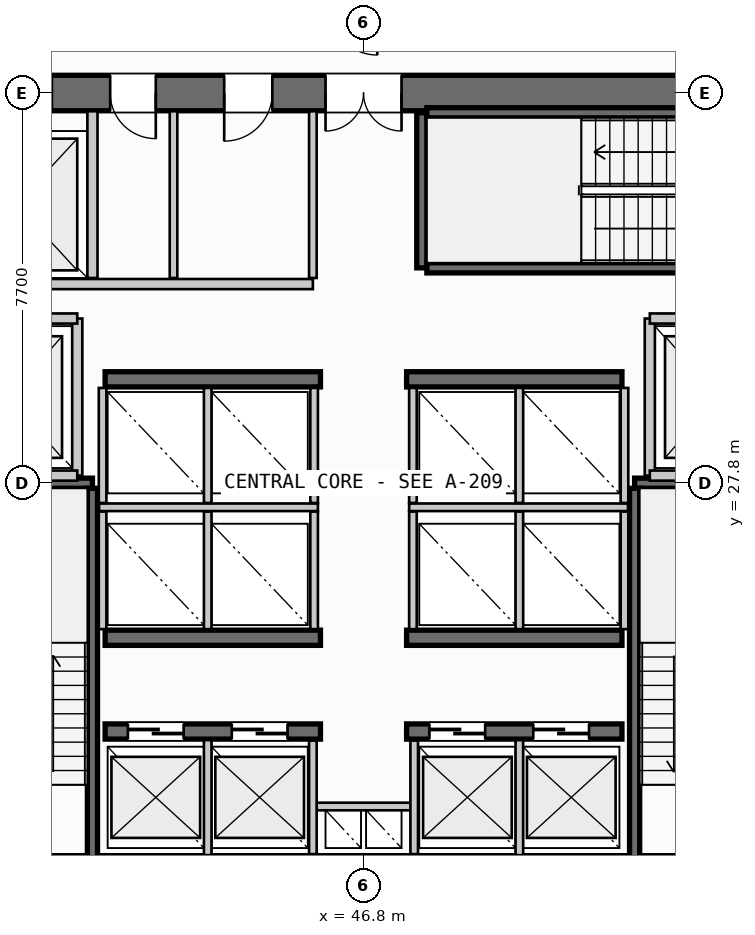
"""IFC4 building model, lengths in metres.
Left out: names, types, materials, properties, quantities, classifications, styles, units other than length and angle.
Written with IfcOpenShell. Run it as: python <this file> out.ifc"""

import sys

from ifc_helpers import new_model, si_unit, direction, frame, frame_2d, origin, place, context, subcontext, project, spatial, rectangle, extrude, source, transform, mapped, element, fill, save


model = new_model("IFC4")
c1 = context("Model", 3, precision=1e-05, world=origin(), true_north=direction((0.0, 1.0)))
c2 = subcontext(c1, "Body", "Model", "MODEL_VIEW")
j1 = project(units=[si_unit("LENGTHUNIT", "METRE"), si_unit("PLANEANGLEUNIT", "RADIAN")], contexts=[c1])
p1 = place(None, origin())
s1 = spatial("IfcSite", under=j1, at=p1, CompositionType="ELEMENT")
p2 = place(p1, origin())
s2 = spatial("IfcBuilding", under=s1, at=p2, CompositionType="ELEMENT")
p3 = place(p2, frame((0.0, 0.0, 60.0)))
s3 = spatial("IfcBuildingStorey", under=s2, at=p3, CompositionType="ELEMENT", Elevation=60.0)
p4 = place(p3, frame((38.0, 20.1, 0.0), z_axis=(0.0, 0.0, 1.0), x_axis=(1.0, 0.0, 0.0)))
e1 = element("IfcWall", 1, at=p4, inside=s3, PredefinedType="SHEAR", context=c2, shape_type="SweptSolid", body=[
    extrude(rectangle(XDim=17.6, YDim=0.7, at=frame_2d((8.8, 0.0))), origin(), (0.0, 0.0, 1.0), 3.55),
])
p5 = place(p4, frame((1.4, 0.0, 0.0)))
e2 = element("IfcOpeningElement", 2, at=p5, cuts=e1, PredefinedType="OPENING", context=c2, shape_type="SweptSolid", body=[
    extrude(rectangle(XDim=1.05, YDim=2.15, at=frame_2d((0.525, 1.075))), frame((0.0, 0.36, 0.0), z_axis=(0.0, -1.0, 0.0), x_axis=(1.0, 0.0, 0.0)), (0.0, 0.0, 1.0), 0.72),
])
p6 = place(p4, frame((15.15, 0.0, 0.0)))
e3 = element("IfcOpeningElement", 3, at=p6, cuts=e1, PredefinedType="OPENING", context=c2, shape_type="SweptSolid", body=[
    extrude(rectangle(XDim=1.05, YDim=2.15, at=frame_2d((0.525, 1.075))), frame((0.0, 0.36, 0.0), z_axis=(0.0, -1.0, 0.0), x_axis=(1.0, 0.0, 0.0)), (0.0, 0.0, 1.0), 0.72),
])
p7 = place(p3, frame((55.6, 35.5, 0.0), z_axis=(0.0, 0.0, 1.0), x_axis=(-1.0, 0.0, 0.0)))
e4 = element("IfcWall", 4, at=p7, inside=s3, PredefinedType="SHEAR", context=c2, shape_type="SweptSolid", body=[
    extrude(rectangle(XDim=17.6, YDim=0.7, at=frame_2d((8.8, 0.0))), origin(), (0.0, 0.0, 1.0), 3.55),
])
p8 = place(p7, frame((8.05, 0.0, 0.0)))
e5 = element("IfcOpeningElement", 5, at=p8, cuts=e4, PredefinedType="OPENING", context=c2, shape_type="SweptSolid", body=[
    extrude(rectangle(XDim=1.5, YDim=2.2, at=frame_2d((0.75, 1.1))), frame((0.0, 0.36, 0.0), z_axis=(0.0, -1.0, 0.0), x_axis=(1.0, 0.0, 0.0)), (0.0, 0.0, 1.0), 0.72),
])
p9 = place(p7, frame((14.95, 0.0, 0.0)))
e6 = element("IfcOpeningElement", 6, at=p9, cuts=e4, PredefinedType="OPENING", context=c2, shape_type="SweptSolid", body=[
    extrude(rectangle(XDim=1.4, YDim=2.3, at=frame_2d((0.7, 1.15))), frame((0.0, 0.36, 0.0), z_axis=(0.0, -1.0, 0.0), x_axis=(1.0, 0.0, 0.0)), (0.0, 0.0, 1.0), 0.72),
])
p10 = place(p7, frame((12.9, 0.0, 0.0)))
e7 = element("IfcOpeningElement", 7, at=p10, cuts=e4, PredefinedType="OPENING", context=c2, shape_type="SweptSolid", body=[
    extrude(rectangle(XDim=0.9, YDim=2.15, at=frame_2d((0.45, 1.075))), frame((0.0, 0.36, 0.0), z_axis=(0.0, -1.0, 0.0), x_axis=(1.0, 0.0, 0.0)), (0.0, 0.0, 1.0), 0.72),
])
p11 = place(p7, frame((10.6, 0.0, 0.0)))
e8 = element("IfcOpeningElement", 8, at=p11, cuts=e4, PredefinedType="OPENING", context=c2, shape_type="SweptSolid", body=[
    extrude(rectangle(XDim=0.95, YDim=2.15, at=frame_2d((0.475, 1.075))), frame((0.0, 0.36, 0.0), z_axis=(0.0, -1.0, 0.0), x_axis=(1.0, 0.0, 0.0)), (0.0, 0.0, 1.0), 0.72),
])
p12 = place(p3, frame((41.7, 22.9, 0.0), z_axis=(0.0, 0.0, 1.0), x_axis=(1.0, 0.0, 0.0)))
e9 = element("IfcWall", 9, at=p12, inside=s3, PredefinedType="SHEAR", context=c2, shape_type="SweptSolid", body=[
    extrude(rectangle(XDim=4.25, YDim=0.3, at=frame_2d((2.125, 0.0))), origin(), (0.0, 0.0, 1.0), 3.55),
])
p13 = place(p12, frame((0.45, 0.0, 0.0)))
e10 = element("IfcOpeningElement", 10, at=p13, cuts=e9, PredefinedType="OPENING", context=c2, shape_type="SweptSolid", body=[
    extrude(rectangle(XDim=1.1, YDim=2.2, at=frame_2d((0.55, 1.1))), frame((0.0, 0.16, 0.0), z_axis=(0.0, -1.0, 0.0), x_axis=(1.0, 0.0, 0.0)), (0.0, 0.0, 1.0), 0.32),
])
p14 = place(p12, frame((2.5, 0.0, 0.0)))
e11 = element("IfcOpeningElement", 11, at=p14, cuts=e9, PredefinedType="OPENING", context=c2, shape_type="SweptSolid", body=[
    extrude(rectangle(XDim=1.1, YDim=2.2, at=frame_2d((0.55, 1.1))), frame((0.0, 0.16, 0.0), z_axis=(0.0, -1.0, 0.0), x_axis=(1.0, 0.0, 0.0)), (0.0, 0.0, 1.0), 0.32),
])
p15 = place(p3, frame((47.65, 22.9, 0.0), z_axis=(0.0, 0.0, 1.0), x_axis=(1.0, 0.0, 0.0)))
e12 = element("IfcWall", 12, at=p15, inside=s3, PredefinedType="SHEAR", context=c2, shape_type="SweptSolid", body=[
    extrude(rectangle(XDim=4.25, YDim=0.3, at=frame_2d((2.125, 0.0))), origin(), (0.0, 0.0, 1.0), 3.55),
])
p16 = place(p15, frame((0.45, 0.0, 0.0)))
e13 = element("IfcOpeningElement", 13, at=p16, cuts=e12, PredefinedType="OPENING", context=c2, shape_type="SweptSolid", body=[
    extrude(rectangle(XDim=1.1, YDim=2.2, at=frame_2d((0.55, 1.1))), frame((0.0, 0.16, 0.0), z_axis=(0.0, -1.0, 0.0), x_axis=(1.0, 0.0, 0.0)), (0.0, 0.0, 1.0), 0.32),
])
p17 = place(p15, frame((2.5, 0.0, 0.0)))
e14 = element("IfcOpeningElement", 14, at=p17, cuts=e12, PredefinedType="OPENING", context=c2, shape_type="SweptSolid", body=[
    extrude(rectangle(XDim=1.1, YDim=2.2, at=frame_2d((0.55, 1.1))), frame((0.0, 0.16, 0.0), z_axis=(0.0, -1.0, 0.0), x_axis=(1.0, 0.0, 0.0)), (0.0, 0.0, 1.0), 0.32),
])
for number, where, z_axis, x_axis in (
    (15, (41.7, 24.75, 0.0), (0.0, 0.0, 1.0), (1.0, 0.0, 0.0)),
    (16, (47.65, 24.75, 0.0), (0.0, 0.0, 1.0), (1.0, 0.0, 0.0)),
    (17, (41.7, 29.85, 0.0), (0.0, 0.0, 1.0), (1.0, 0.0, 0.0)),
    (18, (47.65, 29.85, 0.0), (0.0, 0.0, 1.0), (1.0, 0.0, 0.0)),
):
    element("IfcWall", number, at=place(p3, frame(where, z_axis=z_axis, x_axis=x_axis)), inside=s3, PredefinedType="SHEAR", context=c2, shape_type="SweptSolid", body=[
        extrude(rectangle(XDim=4.25, YDim=0.3, at=frame_2d((2.125, 0.0))), origin(), (0.0, 0.0, 1.0), 3.55),
    ])
p18 = place(p3, frame((38.39, 27.8, 0.0), z_axis=(0.0, 0.0, 1.0), x_axis=(1.0, 0.0, 0.0)))
e19 = element("IfcWall", 19, at=p18, inside=s3, PredefinedType="SHEAR", context=c2, shape_type="SweptSolid", body=[
    extrude(rectangle(XDim=3.06, YDim=0.2, at=frame_2d((1.53, 0.0))), origin(), (0.0, 0.0, 1.0), 3.55),
])
p19 = place(p3, frame((41.45, 27.7, 0.0), z_axis=(0.0, 0.0, 1.0), x_axis=(0.0, -1.0, 0.0)))
e20 = element("IfcWall", 20, at=p19, inside=s3, PredefinedType="SHEAR", context=c2, shape_type="SweptSolid", body=[
    extrude(rectangle(XDim=7.35, YDim=0.2, at=frame_2d((3.675, 0.0))), origin(), (0.0, 0.0, 1.0), 3.55),
])
p20 = place(p3, frame((52.15, 27.8, 0.0), z_axis=(0.0, 0.0, 1.0), x_axis=(1.0, 0.0, 0.0)))
e21 = element("IfcWall", 21, at=p20, inside=s3, PredefinedType="SHEAR", context=c2, shape_type="SweptSolid", body=[
    extrude(rectangle(XDim=3.06, YDim=0.2, at=frame_2d((1.53, 0.0))), origin(), (0.0, 0.0, 1.0), 3.55),
])
p21 = place(p3, frame((52.15, 20.35, 0.0), z_axis=(0.0, 0.0, 1.0), x_axis=(0.0, 1.0, 0.0)))
e22 = element("IfcWall", 22, at=p21, inside=s3, PredefinedType="SHEAR", context=c2, shape_type="SweptSolid", body=[
    extrude(rectangle(XDim=7.35, YDim=0.2, at=frame_2d((3.675, 0.0))), origin(), (0.0, 0.0, 1.0), 3.55),
])
p22 = place(p3, frame((47.95, 32.05, 0.0), z_axis=(0.0, 0.0, 1.0), x_axis=(0.0, 1.0, 0.0)))
e23 = element("IfcWall", 23, at=p22, inside=s3, PredefinedType="SHEAR", context=c2, shape_type="SweptSolid", body=[
    extrude(rectangle(XDim=3.06, YDim=0.2, at=frame_2d((1.53, 0.0))), origin(), (0.0, 0.0, 1.0), 3.55),
])
for number, where, z_axis, x_axis in (
    (24, (48.05, 35.11, 0.0), (0.0, 0.0, 1.0), (1.0, 0.0, 0.0)),
    (25, (55.4, 32.05, 0.0), (0.0, 0.0, 1.0), (-1.0, 0.0, 0.0)),
):
    element("IfcWall", number, at=place(p3, frame(where, z_axis=z_axis, x_axis=x_axis)), inside=s3, PredefinedType="SHEAR", context=c2, shape_type="SweptSolid", body=[
        extrude(rectangle(XDim=7.35, YDim=0.2, at=frame_2d((3.675, 0.0))), origin(), (0.0, 0.0, 1.0), 3.55),
    ])
p23 = place(p3, frame((45.8, 21.42, 0.0), z_axis=(0.0, 0.0, 1.0), x_axis=(1.0, 0.0, 0.0)))
e26 = element("IfcWall", 26, at=p23, inside=s3, PredefinedType="PARTITIONING", context=c2, shape_type="SweptSolid", body=[
    extrude(rectangle(XDim=2.0, YDim=0.15, at=frame_2d((1.0, 0.0))), origin(), (0.0, 0.0, 1.0), 2.645),
])
for number, where, z_axis, x_axis in (
    (27, (45.8, 20.48, 0.0), (0.0, 0.0, 1.0), (0.0, 1.0, 0.0)),
    (28, (47.8, 20.48, 0.0), (0.0, 0.0, 1.0), (0.0, 1.0, 0.0)),
):
    element("IfcWall", number, at=place(p3, frame(where, z_axis=z_axis, x_axis=x_axis)), inside=s3, PredefinedType="PARTITIONING", context=c2, shape_type="SweptSolid", body=[
        extrude(rectangle(XDim=2.24, YDim=0.15, at=frame_2d((1.12, 0.0))), origin(), (0.0, 0.0, 1.0), 2.645),
    ])
p24 = place(p3, frame((41.15, 27.95, 0.0), z_axis=(0.0, 0.0, 1.0), x_axis=(0.0, 1.0, 0.0)))
e29 = element("IfcWall", 29, at=p24, inside=s3, PredefinedType="PARTITIONING", context=c2, shape_type="SweptSolid", body=[
    extrude(rectangle(XDim=3.1, YDim=0.2, at=frame_2d((1.55, 0.0))), origin(), (0.0, 0.0, 1.0), 2.645),
])
for number, where, z_axis, x_axis in (
    (30, (38.36, 27.95, 0.0), (0.0, 0.0, 1.0), (1.0, 0.0, 0.0)),
    (31, (38.36, 31.05, 0.0), (0.0, 0.0, 1.0), (1.0, 0.0, 0.0)),
):
    element("IfcWall", number, at=place(p3, frame(where, z_axis=z_axis, x_axis=x_axis)), inside=s3, PredefinedType="PARTITIONING", context=c2, shape_type="SweptSolid", body=[
        extrude(rectangle(XDim=2.79, YDim=0.2, at=frame_2d((1.395, 0.0))), origin(), (0.0, 0.0, 1.0), 2.645),
    ])
p25 = place(p3, frame((52.45, 27.95, 0.0), z_axis=(0.0, 0.0, 1.0), x_axis=(0.0, 1.0, 0.0)))
e32 = element("IfcWall", 32, at=p25, inside=s3, PredefinedType="PARTITIONING", context=c2, shape_type="SweptSolid", body=[
    extrude(rectangle(XDim=3.1, YDim=0.2, at=frame_2d((1.55, 0.0))), origin(), (0.0, 0.0, 1.0), 2.645),
])
for number, where, z_axis, x_axis in (
    (33, (52.45, 27.95, 0.0), (0.0, 0.0, 1.0), (1.0, 0.0, 0.0)),
    (34, (52.45, 31.05, 0.0), (0.0, 0.0, 1.0), (1.0, 0.0, 0.0)),
):
    element("IfcWall", number, at=place(p3, frame(where, z_axis=z_axis, x_axis=x_axis)), inside=s3, PredefinedType="PARTITIONING", context=c2, shape_type="SweptSolid", body=[
        extrude(rectangle(XDim=2.79, YDim=0.2, at=frame_2d((1.395, 0.0))), origin(), (0.0, 0.0, 1.0), 2.645),
    ])
for number, where, z_axis, x_axis in (
    (35, (43.725, 20.46, 0.0), (0.0, 0.0, 1.0), (0.0, 1.0, 0.0)),
    (36, (49.875, 20.46, 0.0), (0.0, 0.0, 1.0), (0.0, 1.0, 0.0)),
):
    element("IfcWall", number, at=place(p3, frame(where, z_axis=z_axis, x_axis=x_axis)), inside=s3, PredefinedType="PARTITIONING", context=c2, shape_type="SweptSolid", body=[
        extrude(rectangle(XDim=2.27, YDim=0.15, at=frame_2d((1.135, 0.0))), origin(), (0.0, 0.0, 1.0), 2.645),
    ])
p26 = place(p3, frame((41.58, 27.325, 0.0), z_axis=(0.0, 0.0, 1.0), x_axis=(1.0, 0.0, 0.0)))
e37 = element("IfcWall", 37, at=p26, inside=s3, PredefinedType="PARTITIONING", context=c2, shape_type="SweptSolid", body=[
    extrude(rectangle(XDim=4.32, YDim=0.15, at=frame_2d((2.16, 0.0))), origin(), (0.0, 0.0, 1.0), 2.645),
])
p27 = place(p3, frame((47.7, 27.325, 0.0), z_axis=(0.0, 0.0, 1.0), x_axis=(1.0, 0.0, 0.0)))
e38 = element("IfcWall", 38, at=p27, inside=s3, PredefinedType="PARTITIONING", context=c2, shape_type="SweptSolid", body=[
    extrude(rectangle(XDim=4.32, YDim=0.15, at=frame_2d((2.16, 0.0))), origin(), (0.0, 0.0, 1.0), 2.645),
])
for number, where, z_axis, x_axis in (
    (39, (41.65, 24.92, 0.0), (0.0, 0.0, 1.0), (0.0, 1.0, 0.0)),
    (40, (43.725, 24.92, 0.0), (0.0, 0.0, 1.0), (0.0, 1.0, 0.0)),
    (41, (45.825, 24.92, 0.0), (0.0, 0.0, 1.0), (0.0, 1.0, 0.0)),
    (42, (47.775, 24.92, 0.0), (0.0, 0.0, 1.0), (0.0, 1.0, 0.0)),
    (43, (49.875, 24.92, 0.0), (0.0, 0.0, 1.0), (0.0, 1.0, 0.0)),
    (44, (51.95, 24.92, 0.0), (0.0, 0.0, 1.0), (0.0, 1.0, 0.0)),
):
    element("IfcWall", number, at=place(p3, frame(where, z_axis=z_axis, x_axis=x_axis)), inside=s3, PredefinedType="PARTITIONING", context=c2, shape_type="SweptSolid", body=[
        extrude(rectangle(XDim=2.32, YDim=0.15, at=frame_2d((1.16, 0.0))), origin(), (0.0, 0.0, 1.0), 2.645),
    ])
for number, where, z_axis, x_axis in (
    (45, (41.65, 27.41, 0.0), (0.0, 0.0, 1.0), (0.0, 1.0, 0.0)),
    (46, (43.725, 27.41, 0.0), (0.0, 0.0, 1.0), (0.0, 1.0, 0.0)),
    (47, (45.825, 27.41, 0.0), (0.0, 0.0, 1.0), (0.0, 1.0, 0.0)),
    (48, (47.775, 27.41, 0.0), (0.0, 0.0, 1.0), (0.0, 1.0, 0.0)),
    (49, (49.875, 27.41, 0.0), (0.0, 0.0, 1.0), (0.0, 1.0, 0.0)),
    (50, (51.95, 27.41, 0.0), (0.0, 0.0, 1.0), (0.0, 1.0, 0.0)),
):
    element("IfcWall", number, at=place(p3, frame(where, z_axis=z_axis, x_axis=x_axis)), inside=s3, PredefinedType="PARTITIONING", context=c2, shape_type="SweptSolid", body=[
        extrude(rectangle(XDim=2.27, YDim=0.15, at=frame_2d((1.135, 0.0))), origin(), (0.0, 0.0, 1.0), 2.645),
    ])
p28 = place(p3, frame((41.45, 31.85, 0.0), z_axis=(0.0, 0.0, 1.0), x_axis=(0.0, 1.0, 0.0)))
e51 = element("IfcWall", 51, at=p28, inside=s3, PredefinedType="PARTITIONING", context=c2, shape_type="SweptSolid", body=[
    extrude(rectangle(XDim=3.29, YDim=0.2, at=frame_2d((1.645, 0.0))), origin(), (0.0, 0.0, 1.0), 2.645),
])
p29 = place(p3, frame((38.36, 31.73, 0.0), z_axis=(0.0, 0.0, 1.0), x_axis=(1.0, 0.0, 0.0)))
e52 = element("IfcWall", 52, at=p29, inside=s3, PredefinedType="PARTITIONING", context=c2, shape_type="SweptSolid", body=[
    extrude(rectangle(XDim=7.44, YDim=0.2, at=frame_2d((3.72, 0.0))), origin(), (0.0, 0.0, 1.0), 2.645),
])
p30 = place(p3, frame((45.8, 31.85, 0.0), z_axis=(0.0, 0.0, 1.0), x_axis=(0.0, 1.0, 0.0)))
e53 = element("IfcWall", 53, at=p30, inside=s3, PredefinedType="PARTITIONING", context=c2, shape_type="SweptSolid", body=[
    extrude(rectangle(XDim=3.29, YDim=0.15, at=frame_2d((1.645, 0.0))), origin(), (0.0, 0.0, 1.0), 2.645),
])
p31 = place(p3, frame((43.05, 31.85, 0.0), z_axis=(0.0, 0.0, 1.0), x_axis=(0.0, 1.0, 0.0)))
e54 = element("IfcWall", 54, at=p31, inside=s3, PredefinedType="PLUMBINGWALL", context=c2, shape_type="SweptSolid", body=[
    extrude(rectangle(XDim=3.29, YDim=0.15, at=frame_2d((1.645, 0.0))), origin(), (0.0, 0.0, 1.0), 2.645),
])
m1 = source(origin(), c2, "Body", "SweptSolid", [
    extrude(rectangle(XDim=1.5, YDim=2.2, at=frame_2d((0.75, 1.1))), frame((0.0, 0.025, 0.0), z_axis=(0.0, -1.0, 0.0), x_axis=(1.0, 0.0, 0.0)), (0.0, 0.0, 1.0), 0.05),
])
p32 = place(p8, origin())
e55 = element("IfcDoor", 55, at=p32, inside=s3, OperationType="DOUBLE_DOOR_SINGLE_SWING", PredefinedType="DOOR", context=c2, shape_type="MappedRepresentation", body=[
    mapped(m1, transform((0.0, 0.0, 0.0), scale=1.0)),
])
fill(e5, e55)
m2 = source(origin(), c2, "Body", "SweptSolid", [
    extrude(rectangle(XDim=1.1, YDim=2.2, at=frame_2d((0.55, 1.1))), frame((0.0, 0.025, 0.0), z_axis=(0.0, -1.0, 0.0), x_axis=(1.0, 0.0, 0.0)), (0.0, 0.0, 1.0), 0.05),
])
p33 = place(p13, origin())
e56 = element("IfcDoor", 56, at=p33, inside=s3, OperationType="SLIDING_TO_LEFT", PredefinedType="DOOR", context=c2, shape_type="MappedRepresentation", body=[
    mapped(m2, transform((0.0, 0.0, 0.0), scale=1.0)),
])
fill(e10, e56)
p34 = place(p14, origin())
e57 = element("IfcDoor", 57, at=p34, inside=s3, OperationType="SLIDING_TO_LEFT", PredefinedType="DOOR", context=c2, shape_type="MappedRepresentation", body=[
    mapped(m2, transform((0.0, 0.0, 0.0), scale=1.0)),
])
fill(e11, e57)
p35 = place(p16, origin())
e58 = element("IfcDoor", 58, at=p35, inside=s3, OperationType="SLIDING_TO_LEFT", PredefinedType="DOOR", context=c2, shape_type="MappedRepresentation", body=[
    mapped(m2, transform((0.0, 0.0, 0.0), scale=1.0)),
])
fill(e13, e58)
p36 = place(p17, origin())
e59 = element("IfcDoor", 59, at=p36, inside=s3, OperationType="SLIDING_TO_LEFT", PredefinedType="DOOR", context=c2, shape_type="MappedRepresentation", body=[
    mapped(m2, transform((0.0, 0.0, 0.0), scale=1.0)),
])
fill(e14, e59)
m3 = source(origin(), c2, "Body", "SweptSolid", [
    extrude(rectangle(XDim=1.4, YDim=2.3, at=frame_2d((0.7, 1.15))), frame((0.0, 0.025, 0.0), z_axis=(0.0, -1.0, 0.0), x_axis=(1.0, 0.0, 0.0)), (0.0, 0.0, 1.0), 0.05),
])
p37 = place(p9, origin())
e60 = element("IfcDoor", 60, at=p37, inside=s3, OperationType="SLIDING_TO_RIGHT", PredefinedType="DOOR", context=c2, shape_type="MappedRepresentation", body=[
    mapped(m3, transform((0.0, 0.0, 0.0), scale=1.0)),
])
fill(e6, e60)
m4 = source(origin(), c2, "Body", "SweptSolid", [
    extrude(rectangle(XDim=0.9, YDim=2.15, at=frame_2d((0.45, 1.075))), frame((0.0, 0.025, 0.0), z_axis=(0.0, -1.0, 0.0), x_axis=(1.0, 0.0, 0.0)), (0.0, 0.0, 1.0), 0.05),
])
p38 = place(p10, origin())
e61 = element("IfcDoor", 61, at=p38, inside=s3, OperationType="SINGLE_SWING_LEFT", PredefinedType="DOOR", context=c2, shape_type="MappedRepresentation", body=[
    mapped(m4, transform((0.0, 0.0, 0.0), scale=1.0)),
])
fill(e7, e61)
m5 = source(origin(), c2, "Body", "SweptSolid", [
    extrude(rectangle(XDim=0.95, YDim=2.15, at=frame_2d((0.475, 1.075))), frame((0.0, 0.025, 0.0), z_axis=(0.0, -1.0, 0.0), x_axis=(1.0, 0.0, 0.0)), (0.0, 0.0, 1.0), 0.05),
])
p39 = place(p11, origin())
e62 = element("IfcDoor", 62, at=p39, inside=s3, OperationType="SINGLE_SWING_RIGHT", PredefinedType="DOOR", context=c2, shape_type="MappedRepresentation", body=[
    mapped(m5, transform((0.0, 0.0, 0.0), scale=1.0)),
])
fill(e8, e62)
save(model, sys.argv[1])
